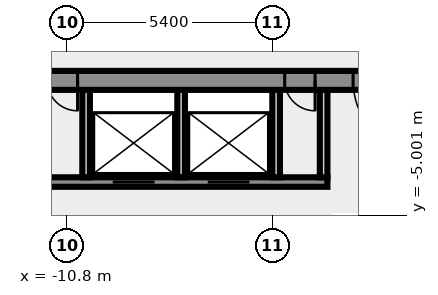
"""IFC4 building model, lengths in metres.
Left out: names, types, materials, properties, quantities, classifications, styles, units other than length and angle.
Written with IfcOpenShell. Run it as: python <this file> out.ifc"""

import sys

from ifc_helpers import new_model, si_unit, direction, frame, frame_2d, origin, place, context, subcontext, project, spatial, rectangle, extrude, element, fill, save


model = new_model("IFC4")
c1 = context("Model", 3, precision=1e-05, world=origin(), true_north=direction((0.0, 1.0)))
c2 = subcontext(c1, "Body", "Model", "MODEL_VIEW")
j1 = project(units=[si_unit("LENGTHUNIT", "METRE"), si_unit("PLANEANGLEUNIT", "RADIAN")], contexts=[c1])
p1 = place(None, origin())
s1 = spatial("IfcSite", under=j1, at=p1, CompositionType="ELEMENT")
p2 = place(p1, origin())
s2 = spatial("IfcBuilding", under=s1, at=p2, CompositionType="ELEMENT")
p3 = place(p2, frame((0.0, 0.0, 323.0)))
s3 = spatial("IfcBuildingStorey", under=s2, at=p3, CompositionType="ELEMENT", Elevation=323.0)
p4 = place(p3, frame((-14.35, -4.125, 0.0), z_axis=(0.0, 0.0, 1.0), x_axis=(1.0, 0.0, 0.0)))
e1 = element("IfcWall", 1, at=p4, inside=s3, PredefinedType="SHEAR", context=c2, shape_type="SweptSolid", body=[
    extrude(rectangle(XDim=10.4, YDim=0.25, at=frame_2d((5.2, 0.0))), origin(), (0.0, 0.0, 1.0), 3.65),
])
p5 = place(p4, frame((4.75, 0.0, 0.0)))
e2 = element("IfcOpeningElement", 2, at=p5, cuts=e1, PredefinedType="OPENING", context=c2, shape_type="SweptSolid", body=[
    extrude(rectangle(XDim=1.1, YDim=2.1, at=frame_2d((0.55, 1.05))), frame((0.0, 0.135, 0.0), z_axis=(0.0, -1.0, 0.0), x_axis=(1.0, 0.0, 0.0)), (0.0, 0.0, 1.0), 0.27),
])
p6 = place(p4, frame((7.25, 0.0, 0.0)))
e3 = element("IfcOpeningElement", 3, at=p6, cuts=e1, PredefinedType="OPENING", context=c2, shape_type="SweptSolid", body=[
    extrude(rectangle(XDim=1.1, YDim=2.1, at=frame_2d((0.55, 1.05))), frame((0.0, 0.135, 0.0), z_axis=(0.0, -1.0, 0.0), x_axis=(1.0, 0.0, 0.0)), (0.0, 0.0, 1.0), 0.27),
])
for number, where, z_axis, x_axis in (
    (4, (-10.3, -4.0, 0.0), (0.0, 0.0, 1.0), (0.0, 1.0, 0.0)),
    (5, (-7.8, -4.0, 0.0), (0.0, 0.0, 1.0), (0.0, 1.0, 0.0)),
    (6, (-5.3, -4.0, 0.0), (0.0, 0.0, 1.0), (0.0, 1.0, 0.0)),
    (7, (-4.05, -4.0, 0.0), (0.0, 0.0, 1.0), (0.0, 1.0, 0.0)),
):
    element("IfcWall", number, at=place(p3, frame(where, z_axis=z_axis, x_axis=x_axis)), inside=s3, PredefinedType="SOLIDWALL", context=c2, shape_type="SweptSolid", body=[
        extrude(rectangle(XDim=2.3, YDim=0.2, at=frame_2d((1.15, 0.0))), origin(), (0.0, 0.0, 1.0), 3.65),
    ])
p7 = place(p3, frame((20.49, -1.45, 0.0), z_axis=(0.0, 0.0, 1.0), x_axis=(-1.0, 0.0, 0.0)))
e8 = element("IfcWall", 8, at=p7, inside=s3, PredefinedType="SHEAR", context=c2, shape_type="SweptSolid", body=[
    extrude(rectangle(XDim=40.98, YDim=0.5, at=frame_2d((20.49, 0.0))), origin(), (0.0, 0.0, 1.0), 3.65),
])
p8 = place(p7, frame((38.14, 0.0, 0.0)))
e9 = element("IfcOpeningElement", 9, at=p8, cuts=e8, PredefinedType="OPENING", context=c2, shape_type="SweptSolid", body=[
    extrude(rectangle(XDim=1.8, YDim=2.1, at=frame_2d((0.9, 1.05))), frame((0.0, 0.26, 0.0), z_axis=(0.0, -1.0, 0.0), x_axis=(1.0, 0.0, 0.0)), (0.0, 0.0, 1.0), 0.52),
])
p9 = place(p7, frame((35.89, 0.0, 0.0)))
e10 = element("IfcOpeningElement", 10, at=p9, cuts=e8, PredefinedType="OPENING", context=c2, shape_type="SweptSolid", body=[
    extrude(rectangle(XDim=0.9, YDim=2.1, at=frame_2d((0.45, 1.05))), frame((0.0, 0.26, 0.0), z_axis=(0.0, -1.0, 0.0), x_axis=(1.0, 0.0, 0.0)), (0.0, 0.0, 1.0), 0.52),
])
p10 = place(p7, frame((32.94, 0.0, 0.0)))
e11 = element("IfcOpeningElement", 11, at=p10, cuts=e8, PredefinedType="OPENING", context=c2, shape_type="SweptSolid", body=[
    extrude(rectangle(XDim=0.9, YDim=2.1, at=frame_2d((0.45, 1.05))), frame((0.0, 0.26, 0.0), z_axis=(0.0, -1.0, 0.0), x_axis=(1.0, 0.0, 0.0)), (0.0, 0.0, 1.0), 0.52),
])
p11 = place(p7, frame((31.015, 0.0, 0.0)))
e12 = element("IfcOpeningElement", 12, at=p11, cuts=e8, PredefinedType="OPENING", context=c2, shape_type="SweptSolid", body=[
    extrude(rectangle(XDim=0.8, YDim=2.1, at=frame_2d((0.4, 1.05))), frame((0.0, 0.26, 0.0), z_axis=(0.0, -1.0, 0.0), x_axis=(1.0, 0.0, 0.0)), (0.0, 0.0, 1.0), 0.52),
])
p12 = place(p7, frame((24.765, 0.0, 0.0)))
e13 = element("IfcOpeningElement", 13, at=p12, cuts=e8, PredefinedType="OPENING", context=c2, shape_type="SweptSolid", body=[
    extrude(rectangle(XDim=0.8, YDim=2.1, at=frame_2d((0.4, 1.05))), frame((0.0, 0.26, 0.0), z_axis=(0.0, -1.0, 0.0), x_axis=(1.0, 0.0, 0.0)), (0.0, 0.0, 1.0), 0.52),
])
p13 = place(p7, frame((21.765, 0.0, 0.0)))
e14 = element("IfcOpeningElement", 14, at=p13, cuts=e8, PredefinedType="OPENING", context=c2, shape_type="SweptSolid", body=[
    extrude(rectangle(XDim=2.0, YDim=2.1, at=frame_2d((1.0, 1.05))), frame((0.0, 0.26, 0.0), z_axis=(0.0, -1.0, 0.0), x_axis=(1.0, 0.0, 0.0)), (0.0, 0.0, 1.0), 0.52),
])
p14 = place(p7, frame((15.103, 0.0, 0.0)))
e15 = element("IfcOpeningElement", 15, at=p14, cuts=e8, PredefinedType="OPENING", context=c2, shape_type="SweptSolid", body=[
    extrude(rectangle(XDim=0.9, YDim=2.1, at=frame_2d((0.45, 1.05))), frame((0.0, 0.26, 0.0), z_axis=(0.0, -1.0, 0.0), x_axis=(1.0, 0.0, 0.0)), (0.0, 0.0, 1.0), 0.52),
])
p15 = place(p7, frame((13.04, 0.0, 0.0)))
e16 = element("IfcOpeningElement", 16, at=p15, cuts=e8, PredefinedType="OPENING", context=c2, shape_type="SweptSolid", body=[
    extrude(rectangle(XDim=0.9, YDim=2.1, at=frame_2d((0.45, 1.05))), frame((0.0, 0.26, 0.0), z_axis=(0.0, -1.0, 0.0), x_axis=(1.0, 0.0, 0.0)), (0.0, 0.0, 1.0), 0.52),
])
p16 = place(p7, frame((10.177, 0.0, 0.0)))
e17 = element("IfcOpeningElement", 17, at=p16, cuts=e8, PredefinedType="OPENING", context=c2, shape_type="SweptSolid", body=[
    extrude(rectangle(XDim=0.9, YDim=2.1, at=frame_2d((0.45, 1.05))), frame((0.0, 0.26, 0.0), z_axis=(0.0, -1.0, 0.0), x_axis=(1.0, 0.0, 0.0)), (0.0, 0.0, 1.0), 0.52),
])
p17 = place(p7, frame((7.14, 0.0, 0.0)))
e18 = element("IfcOpeningElement", 18, at=p17, cuts=e8, PredefinedType="OPENING", context=c2, shape_type="SweptSolid", body=[
    extrude(rectangle(XDim=0.9, YDim=2.1, at=frame_2d((0.45, 1.05))), frame((0.0, 0.26, 0.0), z_axis=(0.0, -1.0, 0.0), x_axis=(1.0, 0.0, 0.0)), (0.0, 0.0, 1.0), 0.52),
])
p18 = place(p7, frame((5.028, 0.0, 0.0)))
e19 = element("IfcOpeningElement", 19, at=p18, cuts=e8, PredefinedType="OPENING", context=c2, shape_type="SweptSolid", body=[
    extrude(rectangle(XDim=0.8, YDim=2.1, at=frame_2d((0.4, 1.05))), frame((0.0, 0.26, 0.0), z_axis=(0.0, -1.0, 0.0), x_axis=(1.0, 0.0, 0.0)), (0.0, 0.0, 1.0), 0.52),
])
p19 = place(p7, frame((3.452, 0.0, 0.0)))
e20 = element("IfcOpeningElement", 20, at=p19, cuts=e8, PredefinedType="OPENING", context=c2, shape_type="SweptSolid", body=[
    extrude(rectangle(XDim=0.8, YDim=2.1, at=frame_2d((0.4, 1.05))), frame((0.0, 0.26, 0.0), z_axis=(0.0, -1.0, 0.0), x_axis=(1.0, 0.0, 0.0)), (0.0, 0.0, 1.0), 0.52),
])
p20 = place(p7, frame((1.04, 0.0, 0.0)))
e21 = element("IfcOpeningElement", 21, at=p20, cuts=e8, PredefinedType="OPENING", context=c2, shape_type="SweptSolid", body=[
    extrude(rectangle(XDim=1.8, YDim=2.1, at=frame_2d((0.9, 1.05))), frame((0.0, 0.26, 0.0), z_axis=(0.0, -1.0, 0.0), x_axis=(1.0, 0.0, 0.0)), (0.0, 0.0, 1.0), 0.52),
])
p21 = place(p5, origin())
e22 = element("IfcDoor", 22, at=p21, inside=s3, OperationType="DOUBLE_DOOR_SLIDING", PredefinedType="DOOR", context=c2, shape_type="SweptSolid", body=[
    extrude(rectangle(XDim=1.1, YDim=2.1, at=frame_2d((0.55, 1.05))), frame((0.0, 0.025, 0.0), z_axis=(0.0, -1.0, 0.0), x_axis=(1.0, 0.0, 0.0)), (0.0, 0.0, 1.0), 0.05),
])
fill(e2, e22)
p22 = place(p6, origin())
e23 = element("IfcDoor", 23, at=p22, inside=s3, OperationType="DOUBLE_DOOR_SLIDING", PredefinedType="DOOR", context=c2, shape_type="SweptSolid", body=[
    extrude(rectangle(XDim=1.1, YDim=2.1, at=frame_2d((0.55, 1.05))), frame((0.0, 0.025, 0.0), z_axis=(0.0, -1.0, 0.0), x_axis=(1.0, 0.0, 0.0)), (0.0, 0.0, 1.0), 0.05),
])
fill(e3, e23)
p23 = place(p11, origin())
e24 = element("IfcDoor", 24, at=p23, inside=s3, OperationType="SINGLE_SWING_RIGHT", PredefinedType="DOOR", context=c2, shape_type="SweptSolid", body=[
    extrude(rectangle(XDim=0.8, YDim=2.1, at=frame_2d((0.4, 1.05))), frame((0.0, 0.025, 0.0), z_axis=(0.0, -1.0, 0.0), x_axis=(1.0, 0.0, 0.0)), (0.0, 0.0, 1.0), 0.05),
])
fill(e12, e24)
p24 = place(p12, origin())
e25 = element("IfcDoor", 25, at=p24, inside=s3, OperationType="SINGLE_SWING_RIGHT", PredefinedType="DOOR", context=c2, shape_type="SweptSolid", body=[
    extrude(rectangle(XDim=0.8, YDim=2.1, at=frame_2d((0.4, 1.05))), frame((0.0, 0.025, 0.0), z_axis=(0.0, -1.0, 0.0), x_axis=(1.0, 0.0, 0.0)), (0.0, 0.0, 1.0), 0.05),
])
fill(e13, e25)
p25 = place(p13, origin())
e26 = element("IfcDoor", 26, at=p25, inside=s3, OperationType="DOUBLE_DOOR_SINGLE_SWING", PredefinedType="DOOR", context=c2, shape_type="SweptSolid", body=[
    extrude(rectangle(XDim=2.0, YDim=2.1, at=frame_2d((1.0, 1.05))), frame((0.0, 0.025, 0.0), z_axis=(0.0, -1.0, 0.0), x_axis=(1.0, 0.0, 0.0)), (0.0, 0.0, 1.0), 0.05),
])
fill(e14, e26)
save(model, sys.argv[1])
